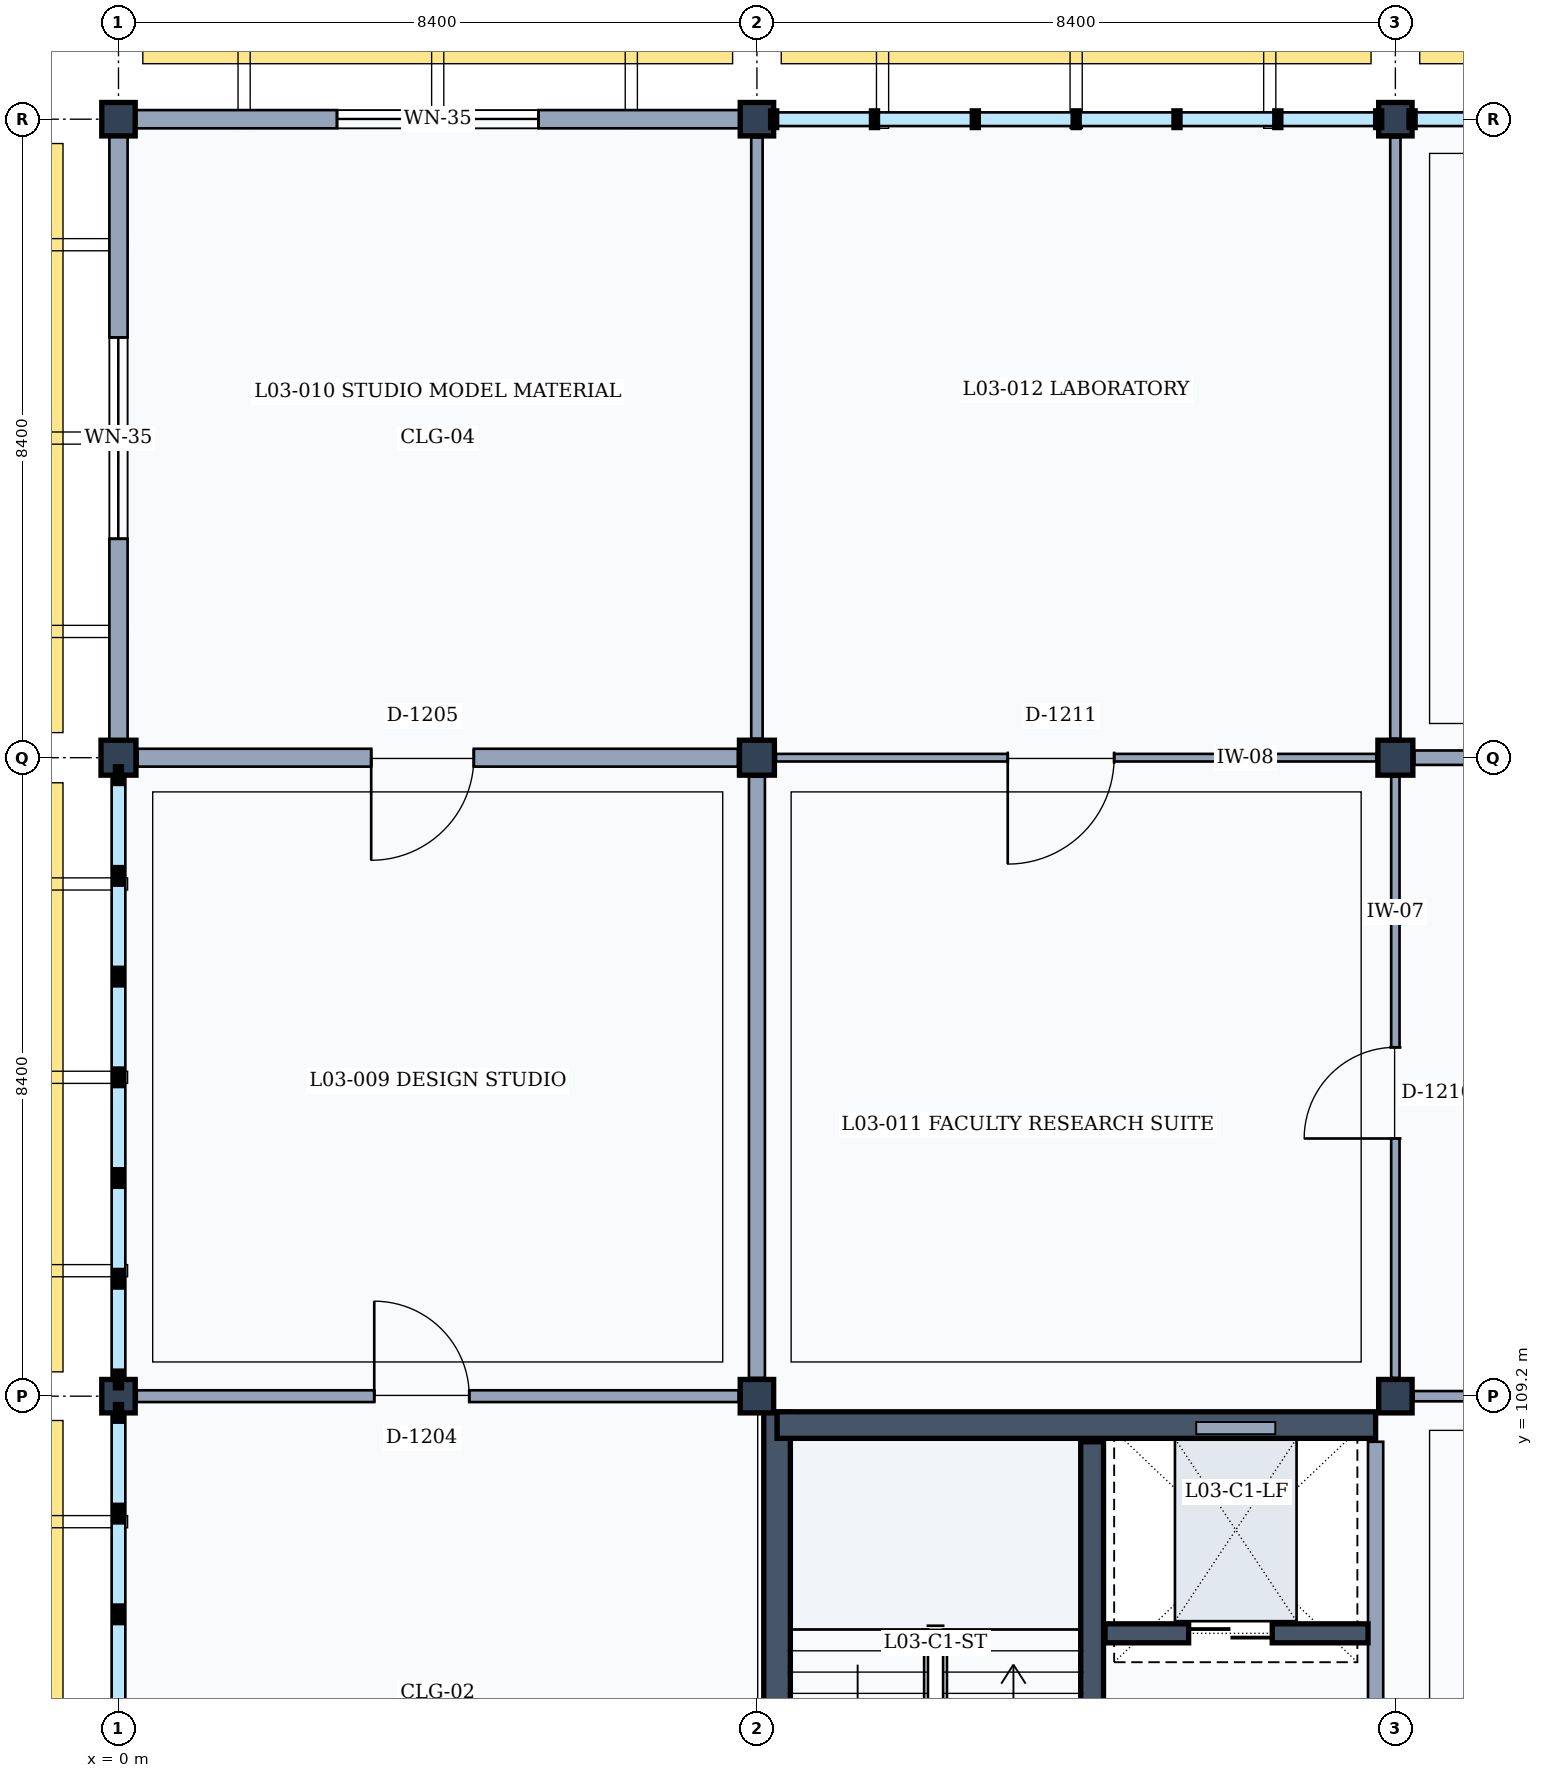
"""IFC4 building model, lengths in metres.
Left out: names, types, materials, properties, quantities, classifications, styles, units other than length and angle.
Written with IfcOpenShell. Run it as: python <this file> out.ifc"""

import sys

from ifc_helpers import new_model, si_unit, direction, frame, frame_2d, origin, origin_2d, place, context, subcontext, project, spatial, rectangle, extrude, element, fill, save


model = new_model("IFC4")
c1 = context("Model", 3, precision=1e-05, world=origin(), true_north=direction((0.0, 1.0)))
c2 = subcontext(c1, "Body", "Model", "MODEL_VIEW")
j1 = project(units=[si_unit("LENGTHUNIT", "METRE"), si_unit("PLANEANGLEUNIT", "RADIAN")], contexts=[c1])
p1 = place(None, origin())
s1 = spatial("IfcSite", under=j1, at=p1, CompositionType="ELEMENT")
p2 = place(p1, origin())
s2 = spatial("IfcBuilding", under=s1, at=p2, CompositionType="ELEMENT")
p3 = place(p2, frame((0.0, 0.0, 13.8)))
s3 = spatial("IfcBuildingStorey", under=s2, at=p3, CompositionType="ELEMENT", Elevation=13.8)
p4 = place(p3, frame((0.0, 109.2, 0.0), z_axis=(0.0, 0.0, 1.0), x_axis=(1.0, 0.0, 0.0)))
e1 = element("IfcColumn", 1, at=p4, inside=s3, PredefinedType="COLUMN", context=c2, shape_type="SweptSolid", body=[
    extrude(rectangle(XDim=0.44, YDim=0.44, at=origin_2d()), origin(), (0.0, 0.0, 1.0), 4.2),
])
p5 = place(p3, frame((0.0, 117.6, 0.0), z_axis=(0.0, 0.0, 1.0), x_axis=(1.0, 0.0, 0.0)))
e2 = element("IfcColumn", 2, at=p5, inside=s3, PredefinedType="COLUMN", context=c2, shape_type="SweptSolid", body=[
    extrude(rectangle(XDim=0.46, YDim=0.46, at=origin_2d()), origin(), (0.0, 0.0, 1.0), 4.2),
])
for number, where, z_axis, x_axis in (
    (3, (0.0, 126.0, 0.0), (0.0, 0.0, 1.0), (1.0, 0.0, 0.0)),
    (4, (8.4, 109.2, 0.0), (0.0, 0.0, 1.0), (1.0, 0.0, 0.0)),
):
    element("IfcColumn", number, at=place(p3, frame(where, z_axis=z_axis, x_axis=x_axis)), inside=s3, PredefinedType="COLUMN", context=c2, shape_type="SweptSolid", body=[
        extrude(rectangle(XDim=0.44, YDim=0.44, at=origin_2d()), origin(), (0.0, 0.0, 1.0), 4.2),
    ])
p6 = place(p3, frame((8.4, 117.6, 0.0), z_axis=(0.0, 0.0, 1.0), x_axis=(1.0, 0.0, 0.0)))
e5 = element("IfcColumn", 5, at=p6, inside=s3, PredefinedType="COLUMN", context=c2, shape_type="SweptSolid", body=[
    extrude(rectangle(XDim=0.46, YDim=0.46, at=origin_2d()), origin(), (0.0, 0.0, 1.0), 4.2),
])
for number, where, z_axis, x_axis in (
    (6, (8.4, 126.0, 0.0), (0.0, 0.0, 1.0), (1.0, 0.0, 0.0)),
    (7, (16.8, 109.2, 0.0), (0.0, 0.0, 1.0), (1.0, 0.0, 0.0)),
):
    element("IfcColumn", number, at=place(p3, frame(where, z_axis=z_axis, x_axis=x_axis)), inside=s3, PredefinedType="COLUMN", context=c2, shape_type="SweptSolid", body=[
        extrude(rectangle(XDim=0.44, YDim=0.44, at=origin_2d()), origin(), (0.0, 0.0, 1.0), 4.2),
    ])
p7 = place(p3, frame((16.8, 117.6, 0.0), z_axis=(0.0, 0.0, 1.0), x_axis=(1.0, 0.0, 0.0)))
e8 = element("IfcColumn", 8, at=p7, inside=s3, PredefinedType="COLUMN", context=c2, shape_type="SweptSolid", body=[
    extrude(rectangle(XDim=0.46, YDim=0.46, at=origin_2d()), origin(), (0.0, 0.0, 1.0), 4.2),
])
p8 = place(p3, frame((16.8, 126.0, 0.0), z_axis=(0.0, 0.0, 1.0), x_axis=(1.0, 0.0, 0.0)))
e9 = element("IfcColumn", 9, at=p8, inside=s3, PredefinedType="COLUMN", context=c2, shape_type="SweptSolid", body=[
    extrude(rectangle(XDim=0.44, YDim=0.44, at=origin_2d()), origin(), (0.0, 0.0, 1.0), 4.2),
])
p9 = place(p3, frame((0.22, 126.0, 0.0), z_axis=(0.0, 0.0, 1.0), x_axis=(1.0, 0.0, 0.0)))
e10 = element("IfcWall", 10, at=p9, inside=s3, PredefinedType="SOLIDWALL", context=c2, shape_type="SweptSolid", body=[
    extrude(rectangle(XDim=7.96, YDim=0.24, at=frame_2d((3.98, 0.0))), origin(), (0.0, 0.0, 1.0), 3.36),
])
p10 = place(p9, frame((2.655, 0.0, 0.9)))
e11 = element("IfcOpeningElement", 11, at=p10, cuts=e10, PredefinedType="OPENING", context=c2, shape_type="SweptSolid", body=[
    extrude(rectangle(XDim=2.65, YDim=1.8, at=frame_2d((1.325, 0.9))), frame((0.0, 0.13, 0.0), z_axis=(0.0, -1.0, 0.0), x_axis=(1.0, 0.0, 0.0)), (0.0, 0.0, 1.0), 0.26),
])
p11 = place(p3, frame((0.0, 117.83, 0.0), z_axis=(0.0, 0.0, 1.0), x_axis=(0.0, 1.0, 0.0)))
e12 = element("IfcWall", 12, at=p11, inside=s3, PredefinedType="SOLIDWALL", context=c2, shape_type="SweptSolid", body=[
    extrude(rectangle(XDim=7.95, YDim=0.24, at=frame_2d((3.975, 0.0))), origin(), (0.0, 0.0, 1.0), 3.36),
])
p12 = place(p11, frame((2.65, 0.0, 0.9)))
e13 = element("IfcOpeningElement", 13, at=p12, cuts=e12, PredefinedType="OPENING", context=c2, shape_type="SweptSolid", body=[
    extrude(rectangle(XDim=2.65, YDim=1.8, at=frame_2d((1.325, 0.9))), frame((0.0, 0.13, 0.0), z_axis=(0.0, -1.0, 0.0), x_axis=(1.0, 0.0, 0.0)), (0.0, 0.0, 1.0), 0.26),
])
p13 = place(p3, frame((8.665, 101.05, 0.0), z_axis=(0.0, 0.0, 1.0), x_axis=(0.0, 1.0, 0.0)))
e14 = element("IfcWall", 14, at=p13, inside=s3, PredefinedType="SHEAR", context=c2, shape_type="SweptSolid", body=[
    extrude(rectangle(XDim=7.94, YDim=0.35, at=frame_2d((3.97, 0.0))), origin(), (0.0, 0.0, 1.0), 3.98),
])
p14 = place(p3, frame((8.665, 108.82, 0.0), z_axis=(0.0, 0.0, 1.0), x_axis=(1.0, 0.0, 0.0)))
e15 = element("IfcWall", 15, at=p14, inside=s3, PredefinedType="SHEAR", context=c2, shape_type="SweptSolid", body=[
    extrude(rectangle(XDim=7.875, YDim=0.35, at=frame_2d((3.938, 0.0))), origin(), (0.0, 0.0, 1.0), 3.98),
])
p15 = place(p3, frame((16.54, 108.6, 0.0), z_axis=(0.0, 0.0, 1.0), x_axis=(0.0, -1.0, 0.0)))
e16 = element("IfcWall", 16, at=p15, inside=s3, PredefinedType="PARTITIONING", context=c2, shape_type="SweptSolid", body=[
    extrude(rectangle(XDim=7.2, YDim=0.2, at=frame_2d((3.6, 0.0))), origin(), (0.0, 0.0, 1.0), 3.32),
])
p16 = place(p15, frame((3.55, 0.0, 0.0)))
e17 = element("IfcOpeningElement", 17, at=p16, cuts=e16, PredefinedType="OPENING", context=c2, shape_type="SweptSolid", body=[
    extrude(rectangle(XDim=1.1, YDim=2.15, at=frame_2d((0.55, 1.075))), frame((0.0, 0.11, 0.0), z_axis=(0.0, -1.0, 0.0), x_axis=(1.0, 0.0, 0.0)), (0.0, 0.0, 1.0), 0.22),
])
p17 = place(p3, frame((12.81, 101.22, 0.0), z_axis=(0.0, 0.0, 1.0), x_axis=(0.0, 1.0, 0.0)))
e18 = element("IfcWall", 18, at=p17, inside=s3, PredefinedType="SHEAR", context=c2, shape_type="SweptSolid", body=[
    extrude(rectangle(XDim=7.38, YDim=0.3, at=frame_2d((3.69, 0.0))), origin(), (0.0, 0.0, 1.0), 3.98),
])
p18 = place(p17, frame((0.28, 0.0, 0.0)))
e19 = element("IfcOpeningElement", 19, at=p18, cuts=e18, PredefinedType="OPENING", context=c2, shape_type="SweptSolid", body=[
    extrude(rectangle(XDim=1.1, YDim=2.15, at=frame_2d((0.55, 1.075))), frame((0.0, 0.16, 0.0), z_axis=(0.0, -1.0, 0.0), x_axis=(1.0, 0.0, 0.0)), (0.0, 0.0, 1.0), 0.32),
])
p19 = place(p3, frame((12.98, 106.08, 0.0), z_axis=(0.0, 0.0, 1.0), x_axis=(1.0, 0.0, 0.0)))
e20 = element("IfcWall", 20, at=p19, inside=s3, PredefinedType="SHEAR", context=c2, shape_type="SweptSolid", body=[
    extrude(rectangle(XDim=3.46, YDim=0.25, at=frame_2d((1.73, 0.0))), origin(), (0.0, 0.0, 1.0), 3.98),
])
p20 = place(p19, frame((1.1, 0.0, 0.0)))
e21 = element("IfcOpeningElement", 21, at=p20, cuts=e20, PredefinedType="OPENING", context=c2, shape_type="SweptSolid", body=[
    extrude(rectangle(XDim=1.1, YDim=2.15, at=frame_2d((0.55, 1.075))), frame((0.0, 0.135, 0.0), z_axis=(0.0, -1.0, 0.0), x_axis=(1.0, 0.0, 0.0)), (0.0, 0.0, 1.0), 0.27),
])
p21 = place(p3, frame((0.24, 109.2, 0.0), z_axis=(0.0, 0.0, 1.0), x_axis=(1.0, 0.0, 0.0)))
e22 = element("IfcWall", 22, at=p21, inside=s3, PredefinedType="PARTITIONING", context=c2, shape_type="SweptSolid", body=[
    extrude(rectangle(XDim=7.92, YDim=0.155, at=frame_2d((3.96, 0.0))), origin(), (0.0, 0.0, 1.0), 3.32),
])
p22 = place(p21, frame((3.125, 0.0, 0.0)))
e23 = element("IfcOpeningElement", 23, at=p22, cuts=e22, PredefinedType="OPENING", context=c2, shape_type="SweptSolid", body=[
    extrude(rectangle(XDim=1.25, YDim=2.3, at=frame_2d((0.625, 1.15))), frame((0.0, 0.087, 0.0), z_axis=(0.0, -1.0, 0.0), x_axis=(1.0, 0.0, 0.0)), (0.0, 0.0, 1.0), 0.175),
])
p23 = place(p3, frame((8.4, 109.44, 0.0), z_axis=(0.0, 0.0, 1.0), x_axis=(0.0, 1.0, 0.0)))
e24 = element("IfcWall", 24, at=p23, inside=s3, PredefinedType="PARTITIONING", context=c2, shape_type="SweptSolid", body=[
    extrude(rectangle(XDim=7.91, YDim=0.21, at=frame_2d((3.955, 0.0))), origin(), (0.0, 0.0, 1.0), 3.32),
])
p24 = place(p3, frame((0.25, 117.6, 0.0), z_axis=(0.0, 0.0, 1.0), x_axis=(1.0, 0.0, 0.0)))
e25 = element("IfcWall", 25, at=p24, inside=s3, PredefinedType="PARTITIONING", context=c2, shape_type="SweptSolid", body=[
    extrude(rectangle(XDim=7.9, YDim=0.235, at=frame_2d((3.95, 0.0))), origin(), (0.0, 0.0, 1.0), 3.32),
])
p25 = place(p24, frame((3.075, 0.0, 0.0)))
e26 = element("IfcOpeningElement", 26, at=p25, cuts=e25, PredefinedType="OPENING", context=c2, shape_type="SweptSolid", body=[
    extrude(rectangle(XDim=1.35, YDim=2.25, at=frame_2d((0.675, 1.125))), frame((0.0, 0.127, 0.0), z_axis=(0.0, -1.0, 0.0), x_axis=(1.0, 0.0, 0.0)), (0.0, 0.0, 1.0), 0.255),
])
p26 = place(p3, frame((8.4, 117.85, 0.0), z_axis=(0.0, 0.0, 1.0), x_axis=(0.0, 1.0, 0.0)))
e27 = element("IfcWall", 27, at=p26, inside=s3, PredefinedType="PARTITIONING", context=c2, shape_type="SweptSolid", body=[
    extrude(rectangle(XDim=7.91, YDim=0.15, at=frame_2d((3.955, 0.0))), origin(), (0.0, 0.0, 1.0), 3.32),
])
p27 = place(p3, frame((16.8, 109.44, 0.0), z_axis=(0.0, 0.0, 1.0), x_axis=(0.0, 1.0, 0.0)))
e28 = element("IfcWall", 28, at=p27, inside=s3, PredefinedType="PARTITIONING", context=c2, shape_type="SweptSolid", body=[
    extrude(rectangle(XDim=7.91, YDim=0.11, at=frame_2d((3.955, 0.0))), origin(), (0.0, 0.0, 1.0), 3.32),
])
p28 = place(p27, frame((3.15, 0.0, 0.0)))
e29 = element("IfcOpeningElement", 29, at=p28, cuts=e28, PredefinedType="OPENING", context=c2, shape_type="SweptSolid", body=[
    extrude(rectangle(XDim=1.2, YDim=2.2, at=frame_2d((0.6, 1.1))), frame((0.0, 0.065, 0.0), z_axis=(0.0, -1.0, 0.0), x_axis=(1.0, 0.0, 0.0)), (0.0, 0.0, 1.0), 0.13),
])
p29 = place(p3, frame((8.65, 117.6, 0.0), z_axis=(0.0, 0.0, 1.0), x_axis=(1.0, 0.0, 0.0)))
e30 = element("IfcWall", 30, at=p29, inside=s3, PredefinedType="MOVABLE", context=c2, shape_type="SweptSolid", body=[
    extrude(rectangle(XDim=7.9, YDim=0.1, at=frame_2d((3.95, 0.0))), origin(), (0.0, 0.0, 1.0), 3.32),
])
p30 = place(p29, frame((3.05, 0.0, 0.0)))
e31 = element("IfcOpeningElement", 31, at=p30, cuts=e30, PredefinedType="OPENING", context=c2, shape_type="SweptSolid", body=[
    extrude(rectangle(XDim=1.4, YDim=2.25, at=frame_2d((0.7, 1.125))), frame((0.0, 0.06, 0.0), z_axis=(0.0, -1.0, 0.0), x_axis=(1.0, 0.0, 0.0)), (0.0, 0.0, 1.0), 0.12),
])
p31 = place(p3, frame((16.8, 117.85, 0.0), z_axis=(0.0, 0.0, 1.0), x_axis=(0.0, 1.0, 0.0)))
e32 = element("IfcWall", 32, at=p31, inside=s3, PredefinedType="PARTITIONING", context=c2, shape_type="SweptSolid", body=[
    extrude(rectangle(XDim=7.91, YDim=0.135, at=frame_2d((3.955, 0.0))), origin(), (0.0, 0.0, 1.0), 3.32),
])
p32 = place(p3, frame((17.04, 109.2, 0.0), z_axis=(0.0, 0.0, 1.0), x_axis=(1.0, 0.0, 0.0)))
e33 = element("IfcWall", 33, at=p32, inside=s3, PredefinedType="PARTITIONING", context=c2, shape_type="SweptSolid", body=[
    extrude(rectangle(XDim=7.92, YDim=0.135, at=frame_2d((3.96, 0.0))), origin(), (0.0, 0.0, 1.0), 3.32),
])
p33 = place(p32, frame((2.8, 0.0, 0.0)))
e34 = element("IfcOpeningElement", 34, at=p33, cuts=e33, PredefinedType="OPENING", context=c2, shape_type="SweptSolid", body=[
    extrude(rectangle(XDim=1.9, YDim=2.4, at=frame_2d((0.95, 1.2))), frame((0.0, 0.077, 0.0), z_axis=(0.0, -1.0, 0.0), x_axis=(1.0, 0.0, 0.0)), (0.0, 0.0, 1.0), 0.155),
])
p34 = place(p3, frame((17.05, 117.6, 0.0), z_axis=(0.0, 0.0, 1.0), x_axis=(1.0, 0.0, 0.0)))
e35 = element("IfcWall", 35, at=p34, inside=s3, PredefinedType="PARTITIONING", context=c2, shape_type="SweptSolid", body=[
    extrude(rectangle(XDim=7.9, YDim=0.19, at=frame_2d((3.95, 0.0))), origin(), (0.0, 0.0, 1.0), 3.32),
])
p35 = place(p34, frame((3.3, 0.0, 0.0)))
e36 = element("IfcOpeningElement", 36, at=p35, cuts=e35, PredefinedType="OPENING", context=c2, shape_type="SweptSolid", body=[
    extrude(rectangle(XDim=0.9, YDim=2.1, at=frame_2d((0.45, 1.05))), frame((0.0, 0.105, 0.0), z_axis=(0.0, -1.0, 0.0), x_axis=(1.0, 0.0, 0.0)), (0.0, 0.0, 1.0), 0.21),
])
p36 = place(p10, origin())
e37 = element("IfcWindow", 37, at=p36, inside=s3, PartitioningType="SINGLE_PANEL", PredefinedType="WINDOW", context=c2, shape_type="SweptSolid", body=[
    extrude(rectangle(XDim=2.65, YDim=1.8, at=frame_2d((1.325, 0.9))), frame((0.0, 0.03, 0.0), z_axis=(0.0, -1.0, 0.0), x_axis=(1.0, 0.0, 0.0)), (0.0, 0.0, 1.0), 0.06),
])
fill(e11, e37)
p37 = place(p12, origin())
e38 = element("IfcWindow", 38, at=p37, inside=s3, PartitioningType="SINGLE_PANEL", PredefinedType="WINDOW", context=c2, shape_type="SweptSolid", body=[
    extrude(rectangle(XDim=2.65, YDim=1.8, at=frame_2d((1.325, 0.9))), frame((0.0, 0.03, 0.0), z_axis=(0.0, -1.0, 0.0), x_axis=(1.0, 0.0, 0.0)), (0.0, 0.0, 1.0), 0.06),
])
fill(e13, e38)
p38 = place(p20, origin())
e39 = element("IfcDoor", 39, at=p38, inside=s3, OperationType="DOUBLE_DOOR_SLIDING", PredefinedType="DOOR", context=c2, shape_type="SweptSolid", body=[
    extrude(rectangle(XDim=1.1, YDim=2.15, at=frame_2d((0.55, 1.075))), frame((0.0, 0.025, 0.0), z_axis=(0.0, -1.0, 0.0), x_axis=(1.0, 0.0, 0.0)), (0.0, 0.0, 1.0), 0.05),
])
fill(e21, e39)
p39 = place(p22, origin())
e40 = element("IfcDoor", 40, at=p39, inside=s3, OperationType="SINGLE_SWING_LEFT", PredefinedType="DOOR", context=c2, shape_type="SweptSolid", body=[
    extrude(rectangle(XDim=1.25, YDim=2.3, at=frame_2d((0.625, 1.15))), frame((0.0, 0.025, 0.0), z_axis=(0.0, -1.0, 0.0), x_axis=(1.0, 0.0, 0.0)), (0.0, 0.0, 1.0), 0.05),
])
fill(e23, e40)
p40 = place(p25, frame((1.35, 0.0, 0.0), z_axis=(0.0, 0.0, 1.0), x_axis=(-1.0, 0.0, 0.0)))
e41 = element("IfcDoor", 41, at=p40, inside=s3, OperationType="SINGLE_SWING_RIGHT", PredefinedType="DOOR", context=c2, shape_type="SweptSolid", body=[
    extrude(rectangle(XDim=1.35, YDim=2.25, at=frame_2d((0.675, 1.125))), frame((0.0, 0.025, 0.0), z_axis=(0.0, -1.0, 0.0), x_axis=(1.0, 0.0, 0.0)), (0.0, 0.0, 1.0), 0.05),
])
fill(e26, e41)
p41 = place(p28, origin())
e42 = element("IfcDoor", 42, at=p41, inside=s3, OperationType="SINGLE_SWING_LEFT", PredefinedType="DOOR", context=c2, shape_type="SweptSolid", body=[
    extrude(rectangle(XDim=1.2, YDim=2.2, at=frame_2d((0.6, 1.1))), frame((0.0, 0.025, 0.0), z_axis=(0.0, -1.0, 0.0), x_axis=(1.0, 0.0, 0.0)), (0.0, 0.0, 1.0), 0.05),
])
fill(e29, e42)
p42 = place(p30, frame((1.4, 0.0, 0.0), z_axis=(0.0, 0.0, 1.0), x_axis=(-1.0, 0.0, 0.0)))
e43 = element("IfcDoor", 43, at=p42, inside=s3, OperationType="SINGLE_SWING_RIGHT", PredefinedType="DOOR", context=c2, shape_type="SweptSolid", body=[
    extrude(rectangle(XDim=1.4, YDim=2.25, at=frame_2d((0.7, 1.125))), frame((0.0, 0.025, 0.0), z_axis=(0.0, -1.0, 0.0), x_axis=(1.0, 0.0, 0.0)), (0.0, 0.0, 1.0), 0.05),
])
fill(e31, e43)
save(model, sys.argv[1])
